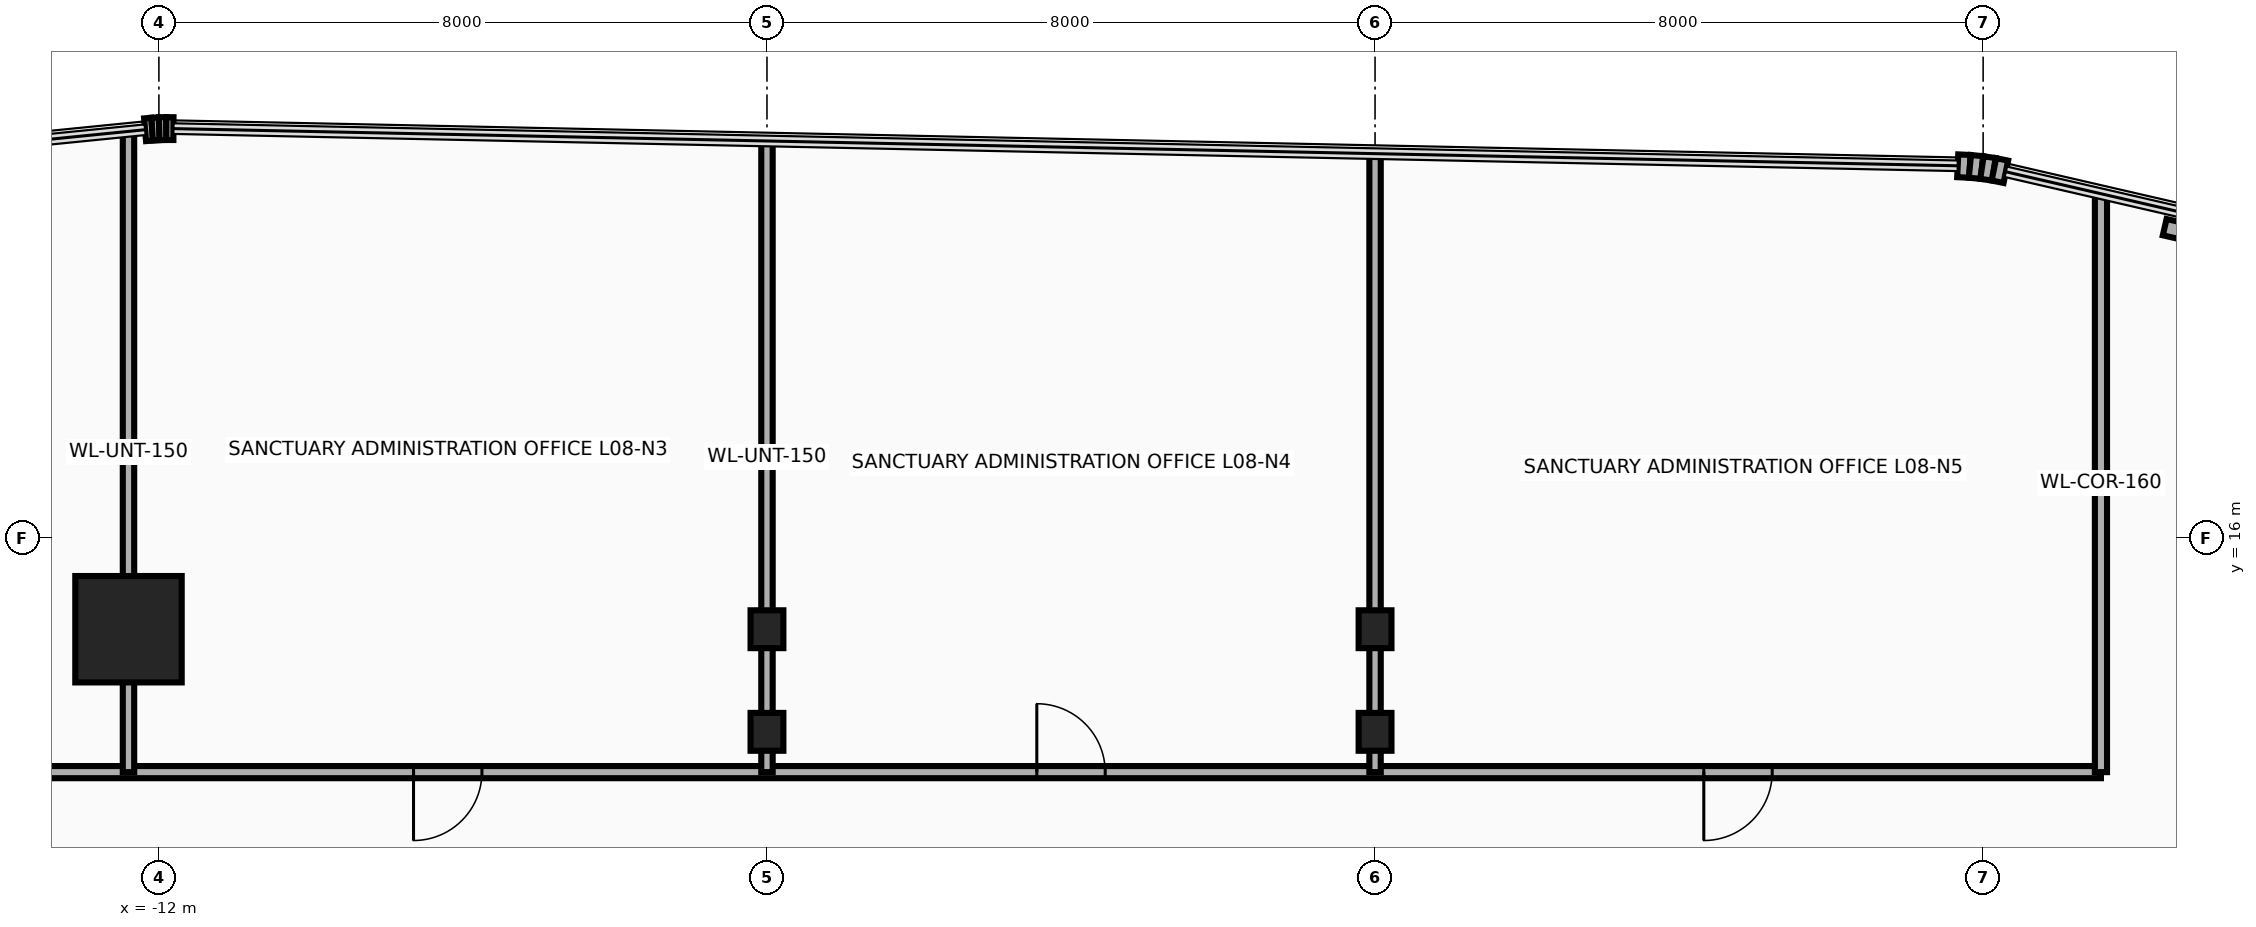
"""IFC4 building model, lengths in metres.
Left out: names, types, materials, properties, quantities, classifications, styles, units other than length and angle.
Written with IfcOpenShell. Run it as: python <this file> out.ifc"""

import sys

from ifc_helpers import new_model, si_unit, direction, frame, frame_2d, origin, origin_2d, place, context, subcontext, project, spatial, rectangle, i_section, extrude, source, transform, mapped, element, fill, save


model = new_model("IFC4")
c1 = context("Model", 3, precision=1e-05, world=origin(), true_north=direction((0.0, 1.0)))
c2 = subcontext(c1, "Body", "Model", "MODEL_VIEW")
j1 = project(units=[si_unit("LENGTHUNIT", "METRE"), si_unit("PLANEANGLEUNIT", "RADIAN")], contexts=[c1])
p1 = place(None, origin())
s1 = spatial("IfcSite", under=j1, at=p1, CompositionType="ELEMENT")
p2 = place(p1, origin())
s2 = spatial("IfcBuilding", under=s1, at=p2, CompositionType="ELEMENT")
p3 = place(p2, frame((0.0, 0.0, 37.1)))
s3 = spatial("IfcBuildingStorey", under=s2, at=p3, CompositionType="ELEMENT", Elevation=37.1)
m1 = source(origin(), c2, "Body", "SweptSolid", [
    extrude(rectangle(XDim=1.4, YDim=1.4, at=origin_2d()), origin(), (0.0, 0.0, 1.0), 3.7),
])
p4 = place(p3, frame((-12.4, 14.8, 0.0), z_axis=(0.0, 0.0, 1.0), x_axis=(1.0, 0.0, 0.0)))
e1 = element("IfcColumn", 1, at=p4, inside=s3, PredefinedType="COLUMN", context=c2, shape_type="MappedRepresentation", body=[
    mapped(m1, transform((0.0, 0.0, 0.0), x_axis=(1.0, 0.0, 0.0), y_axis=(0.0, 1.0, 0.0), z_axis=(0.0, 0.0, 1.0), scale=1.0)),
])
m2 = source(origin(), c2, "Body", "SweptSolid", [
    extrude(i_section(OverallWidth=0.432, OverallDepth=0.498, WebThickness=0.056, FlangeThickness=0.089, at=origin_2d()), origin(), (0.0, 0.0, 1.0), 3.7),
])
for number, where, z_axis, x_axis in (
    (2, (-4.0, 13.45, 0.0), (0.0, 0.0, 1.0), (1.0, 0.0, 0.0)),
    (3, (-4.0, 14.8, 0.0), (0.0, 0.0, 1.0), (1.0, 0.0, 0.0)),
    (4, (4.0, 13.45, 0.0), (0.0, 0.0, 1.0), (1.0, 0.0, 0.0)),
    (5, (4.0, 14.8, 0.0), (0.0, 0.0, 1.0), (1.0, 0.0, 0.0)),
):
    element("IfcColumn", number, at=place(p3, frame(where, z_axis=z_axis, x_axis=x_axis)), inside=s3, PredefinedType="COLUMN", context=c2, shape_type="MappedRepresentation", body=[
        mapped(m2, transform((0.0, 0.0, 0.0), x_axis=(1.0, 0.0, 0.0), y_axis=(0.0, 1.0, 0.0), z_axis=(0.0, 0.0, 1.0), scale=1.0)),
    ])
p5 = place(p3, frame((-12.182, 21.371, 0.0), z_axis=(0.0, 0.0, 1.0), x_axis=(0.996527790842, 0.08326080759, 0.0)))
e6 = element("IfcWall", 6, at=p5, inside=s3, PredefinedType="SOLIDWALL", context=c2, shape_type="SweptSolid", body=[
    extrude(rectangle(XDim=0.094, YDim=0.3, at=frame_2d((0.047, 0.0))), origin(), (0.0, 0.0, 1.0), 3.46),
])
p6 = place(p3, frame((-12.088, 21.379, 0.0), z_axis=(0.0, 0.0, 1.0), x_axis=(0.998476480444, 0.055178963393, 0.0)))
e7 = element("IfcWall", 7, at=p6, inside=s3, PredefinedType="SOLIDWALL", context=c2, shape_type="SweptSolid", body=[
    extrude(rectangle(XDim=0.093, YDim=0.3, at=frame_2d((0.046, 0.0))), origin(), (0.0, 0.0, 1.0), 3.46),
])
p7 = place(p3, frame((-11.996, 21.384, 0.0), z_axis=(0.0, 0.0, 1.0), x_axis=(0.999722573757, 0.023553673204, 0.0)))
e8 = element("IfcWall", 8, at=p7, inside=s3, PredefinedType="SOLIDWALL", context=c2, shape_type="SweptSolid", body=[
    extrude(rectangle(XDim=0.093, YDim=0.3, at=frame_2d((0.047, 0.0))), origin(), (0.0, 0.0, 1.0), 3.46),
])
p8 = place(p3, frame((-11.902, 21.386, 0.0), z_axis=(0.0, 0.0, 1.0), x_axis=(0.999986507273, -0.005194735103, 0.0)))
e9 = element("IfcWall", 9, at=p8, inside=s3, PredefinedType="SOLIDWALL", context=c2, shape_type="SweptSolid", body=[
    extrude(rectangle(XDim=0.094, YDim=0.3, at=frame_2d((0.047, 0.0))), origin(), (0.0, 0.0, 1.0), 3.46),
])
p9 = place(p3, frame((11.666, 20.897, 0.0), z_axis=(0.0, 0.0, 1.0), x_axis=(0.998885297239, -0.047203421059, 0.0)))
e10 = element("IfcWall", 10, at=p9, inside=s3, PredefinedType="SOLIDWALL", context=c2, shape_type="SweptSolid", body=[
    extrude(rectangle(XDim=0.16, YDim=0.3, at=frame_2d((0.08, 0.0))), origin(), (0.0, 0.0, 1.0), 3.46),
])
p10 = place(p3, frame((11.826, 20.889, 0.0), z_axis=(0.0, 0.0, 1.0), x_axis=(0.995172891136, -0.098137234257, 0.0)))
e11 = element("IfcWall", 11, at=p10, inside=s3, PredefinedType="SOLIDWALL", context=c2, shape_type="SweptSolid", body=[
    extrude(rectangle(XDim=0.159, YDim=0.3, at=frame_2d((0.08, 0.0))), origin(), (0.0, 0.0, 1.0), 3.46),
])
p11 = place(p3, frame((11.984, 20.874, 0.0), z_axis=(0.0, 0.0, 1.0), x_axis=(0.988846069207, -0.148941100486, 0.0)))
e12 = element("IfcWall", 12, at=p11, inside=s3, PredefinedType="SOLIDWALL", context=c2, shape_type="SweptSolid", body=[
    extrude(rectangle(XDim=0.159, YDim=0.3, at=frame_2d((0.08, 0.0))), origin(), (0.0, 0.0, 1.0), 3.46),
])
p12 = place(p3, frame((12.142, 20.85, 0.0), z_axis=(0.0, 0.0, 1.0), x_axis=(0.979991950448, -0.19903712482, 0.0)))
e13 = element("IfcWall", 13, at=p12, inside=s3, PredefinedType="SOLIDWALL", context=c2, shape_type="SweptSolid", body=[
    extrude(rectangle(XDim=0.161, YDim=0.3, at=frame_2d((0.08, 0.0))), origin(), (0.0, 0.0, 1.0), 3.46),
])
p13 = place(p3, frame((14.389, 20.09, 0.0), z_axis=(0.0, 0.0, 1.0), x_axis=(0.974400545997, -0.224818984875, 0.0)))
e14 = element("IfcWall", 14, at=p13, inside=s3, PredefinedType="SOLIDWALL", context=c2, shape_type="SweptSolid", body=[
    extrude(rectangle(XDim=2.2, YDim=0.22, at=frame_2d((1.1, 0.0))), origin(), (0.0, 0.0, 1.0), 3.46),
])
p14 = place(p13, frame((0.65, 0.0, 0.95)))
e15 = element("IfcOpeningElement", 15, at=p14, cuts=e14, PredefinedType="OPENING", context=c2, shape_type="SweptSolid", body=[
    extrude(rectangle(XDim=0.9, YDim=1.3, at=frame_2d((0.45, 0.65))), frame((0.0, 0.125, 0.0), z_axis=(0.0, -1.0, 0.0), x_axis=(1.0, 0.0, 0.0)), (0.0, 0.0, 1.0), 0.25),
])
p15 = place(p3, frame((-31.89, 12.92, 0.0), z_axis=(0.0, 0.0, 1.0), x_axis=(1.0, 0.0, 0.0)))
e16 = element("IfcWall", 16, at=p15, inside=s3, PredefinedType="PARTITIONING", context=c2, shape_type="SweptSolid", body=[
    extrude(rectangle(XDim=45.44, YDim=0.16, at=frame_2d((22.72, 0.0))), origin(), (0.0, 0.0, 1.0), 2.583),
])
p16 = place(p15, frame((4.17, 0.0, 0.0)))
e17 = element("IfcOpeningElement", 17, at=p16, cuts=e16, PredefinedType="OPENING", context=c2, shape_type="SweptSolid", body=[
    extrude(rectangle(XDim=0.9, YDim=2.1, at=frame_2d((0.45, 1.05))), frame((0.0, 0.095, 0.0), z_axis=(0.0, -1.0, 0.0), x_axis=(1.0, 0.0, 0.0)), (0.0, 0.0, 1.0), 0.19),
])
p17 = place(p15, frame((13.915, 0.0, 0.0)))
e18 = element("IfcOpeningElement", 18, at=p17, cuts=e16, PredefinedType="OPENING", context=c2, shape_type="SweptSolid", body=[
    extrude(rectangle(XDim=0.9, YDim=2.1, at=frame_2d((0.45, 1.05))), frame((0.0, 0.095, 0.0), z_axis=(0.0, -1.0, 0.0), x_axis=(1.0, 0.0, 0.0)), (0.0, 0.0, 1.0), 0.19),
])
p18 = place(p15, frame((23.24, 0.0, 0.0)))
e19 = element("IfcOpeningElement", 19, at=p18, cuts=e16, PredefinedType="OPENING", context=c2, shape_type="SweptSolid", body=[
    extrude(rectangle(XDim=0.9, YDim=2.1, at=frame_2d((0.45, 1.05))), frame((0.0, 0.095, 0.0), z_axis=(0.0, -1.0, 0.0), x_axis=(1.0, 0.0, 0.0)), (0.0, 0.0, 1.0), 0.19),
])
p19 = place(p15, frame((31.44, 0.0, 0.0)))
e20 = element("IfcOpeningElement", 20, at=p19, cuts=e16, PredefinedType="OPENING", context=c2, shape_type="SweptSolid", body=[
    extrude(rectangle(XDim=0.9, YDim=2.1, at=frame_2d((0.45, 1.05))), frame((0.0, 0.095, 0.0), z_axis=(0.0, -1.0, 0.0), x_axis=(1.0, 0.0, 0.0)), (0.0, 0.0, 1.0), 0.19),
])
p20 = place(p15, frame((40.215, 0.0, 0.0)))
e21 = element("IfcOpeningElement", 21, at=p20, cuts=e16, PredefinedType="OPENING", context=c2, shape_type="SweptSolid", body=[
    extrude(rectangle(XDim=0.9, YDim=2.1, at=frame_2d((0.45, 1.05))), frame((0.0, 0.095, 0.0), z_axis=(0.0, -1.0, 0.0), x_axis=(1.0, 0.0, 0.0)), (0.0, 0.0, 1.0), 0.19),
])
p21 = place(p3, frame((13.55, 12.92, 0.0), z_axis=(0.0, 0.0, 1.0), x_axis=(0.0, 1.0, 0.0)))
e22 = element("IfcWall", 22, at=p21, inside=s3, PredefinedType="PARTITIONING", context=c2, shape_type="SweptSolid", body=[
    extrude(rectangle(XDim=7.609, YDim=0.16, at=frame_2d((3.805, 0.0))), origin(), (0.0, 0.0, 1.0), 2.583),
])
p22 = place(p3, frame((-12.4, 12.92, 0.0), z_axis=(0.0, 0.0, 1.0), x_axis=(0.0, 1.0, 0.0)))
e23 = element("IfcWall", 23, at=p22, inside=s3, PredefinedType="PARTITIONING", context=c2, shape_type="SweptSolid", body=[
    extrude(rectangle(XDim=8.43, YDim=0.15, at=frame_2d((4.215, 0.0))), origin(), (0.0, 0.0, 1.0), 2.583),
])
p23 = place(p3, frame((-4.0, 12.92, 0.0), z_axis=(0.0, 0.0, 1.0), x_axis=(0.0, 1.0, 0.0)))
e24 = element("IfcWall", 24, at=p23, inside=s3, PredefinedType="PARTITIONING", context=c2, shape_type="SweptSolid", body=[
    extrude(rectangle(XDim=8.303, YDim=0.15, at=frame_2d((4.152, 0.0))), origin(), (0.0, 0.0, 1.0), 2.583),
])
p24 = place(p3, frame((4.0, 12.92, 0.0), z_axis=(0.0, 0.0, 1.0), x_axis=(0.0, 1.0, 0.0)))
e25 = element("IfcWall", 25, at=p24, inside=s3, PredefinedType="PARTITIONING", context=c2, shape_type="SweptSolid", body=[
    extrude(rectangle(XDim=8.137, YDim=0.15, at=frame_2d((4.068, 0.0))), origin(), (0.0, 0.0, 1.0), 2.583),
])
p25 = place(p18, frame((0.9, 0.0, 0.0), z_axis=(0.0, 0.0, 1.0), x_axis=(-1.0, 0.0, 0.0)))
e26 = element("IfcDoor", 26, at=p25, inside=s3, OperationType="SINGLE_SWING_LEFT", PredefinedType="DOOR", context=c2, shape_type="SweptSolid", body=[
    extrude(rectangle(XDim=0.9, YDim=2.1, at=frame_2d((0.45, 1.05))), frame((0.0, 0.025, 0.0), z_axis=(0.0, -1.0, 0.0), x_axis=(1.0, 0.0, 0.0)), (0.0, 0.0, 1.0), 0.05),
])
fill(e19, e26)
p26 = place(p19, origin())
e27 = element("IfcDoor", 27, at=p26, inside=s3, OperationType="SINGLE_SWING_RIGHT", PredefinedType="DOOR", context=c2, shape_type="SweptSolid", body=[
    extrude(rectangle(XDim=0.9, YDim=2.1, at=frame_2d((0.45, 1.05))), frame((0.0, 0.025, 0.0), z_axis=(0.0, -1.0, 0.0), x_axis=(1.0, 0.0, 0.0)), (0.0, 0.0, 1.0), 0.05),
])
fill(e20, e27)
p27 = place(p20, frame((0.9, 0.0, 0.0), z_axis=(0.0, 0.0, 1.0), x_axis=(-1.0, 0.0, 0.0)))
e28 = element("IfcDoor", 28, at=p27, inside=s3, OperationType="SINGLE_SWING_LEFT", PredefinedType="DOOR", context=c2, shape_type="SweptSolid", body=[
    extrude(rectangle(XDim=0.9, YDim=2.1, at=frame_2d((0.45, 1.05))), frame((0.0, 0.025, 0.0), z_axis=(0.0, -1.0, 0.0), x_axis=(1.0, 0.0, 0.0)), (0.0, 0.0, 1.0), 0.05),
])
fill(e21, e28)
save(model, sys.argv[1])
